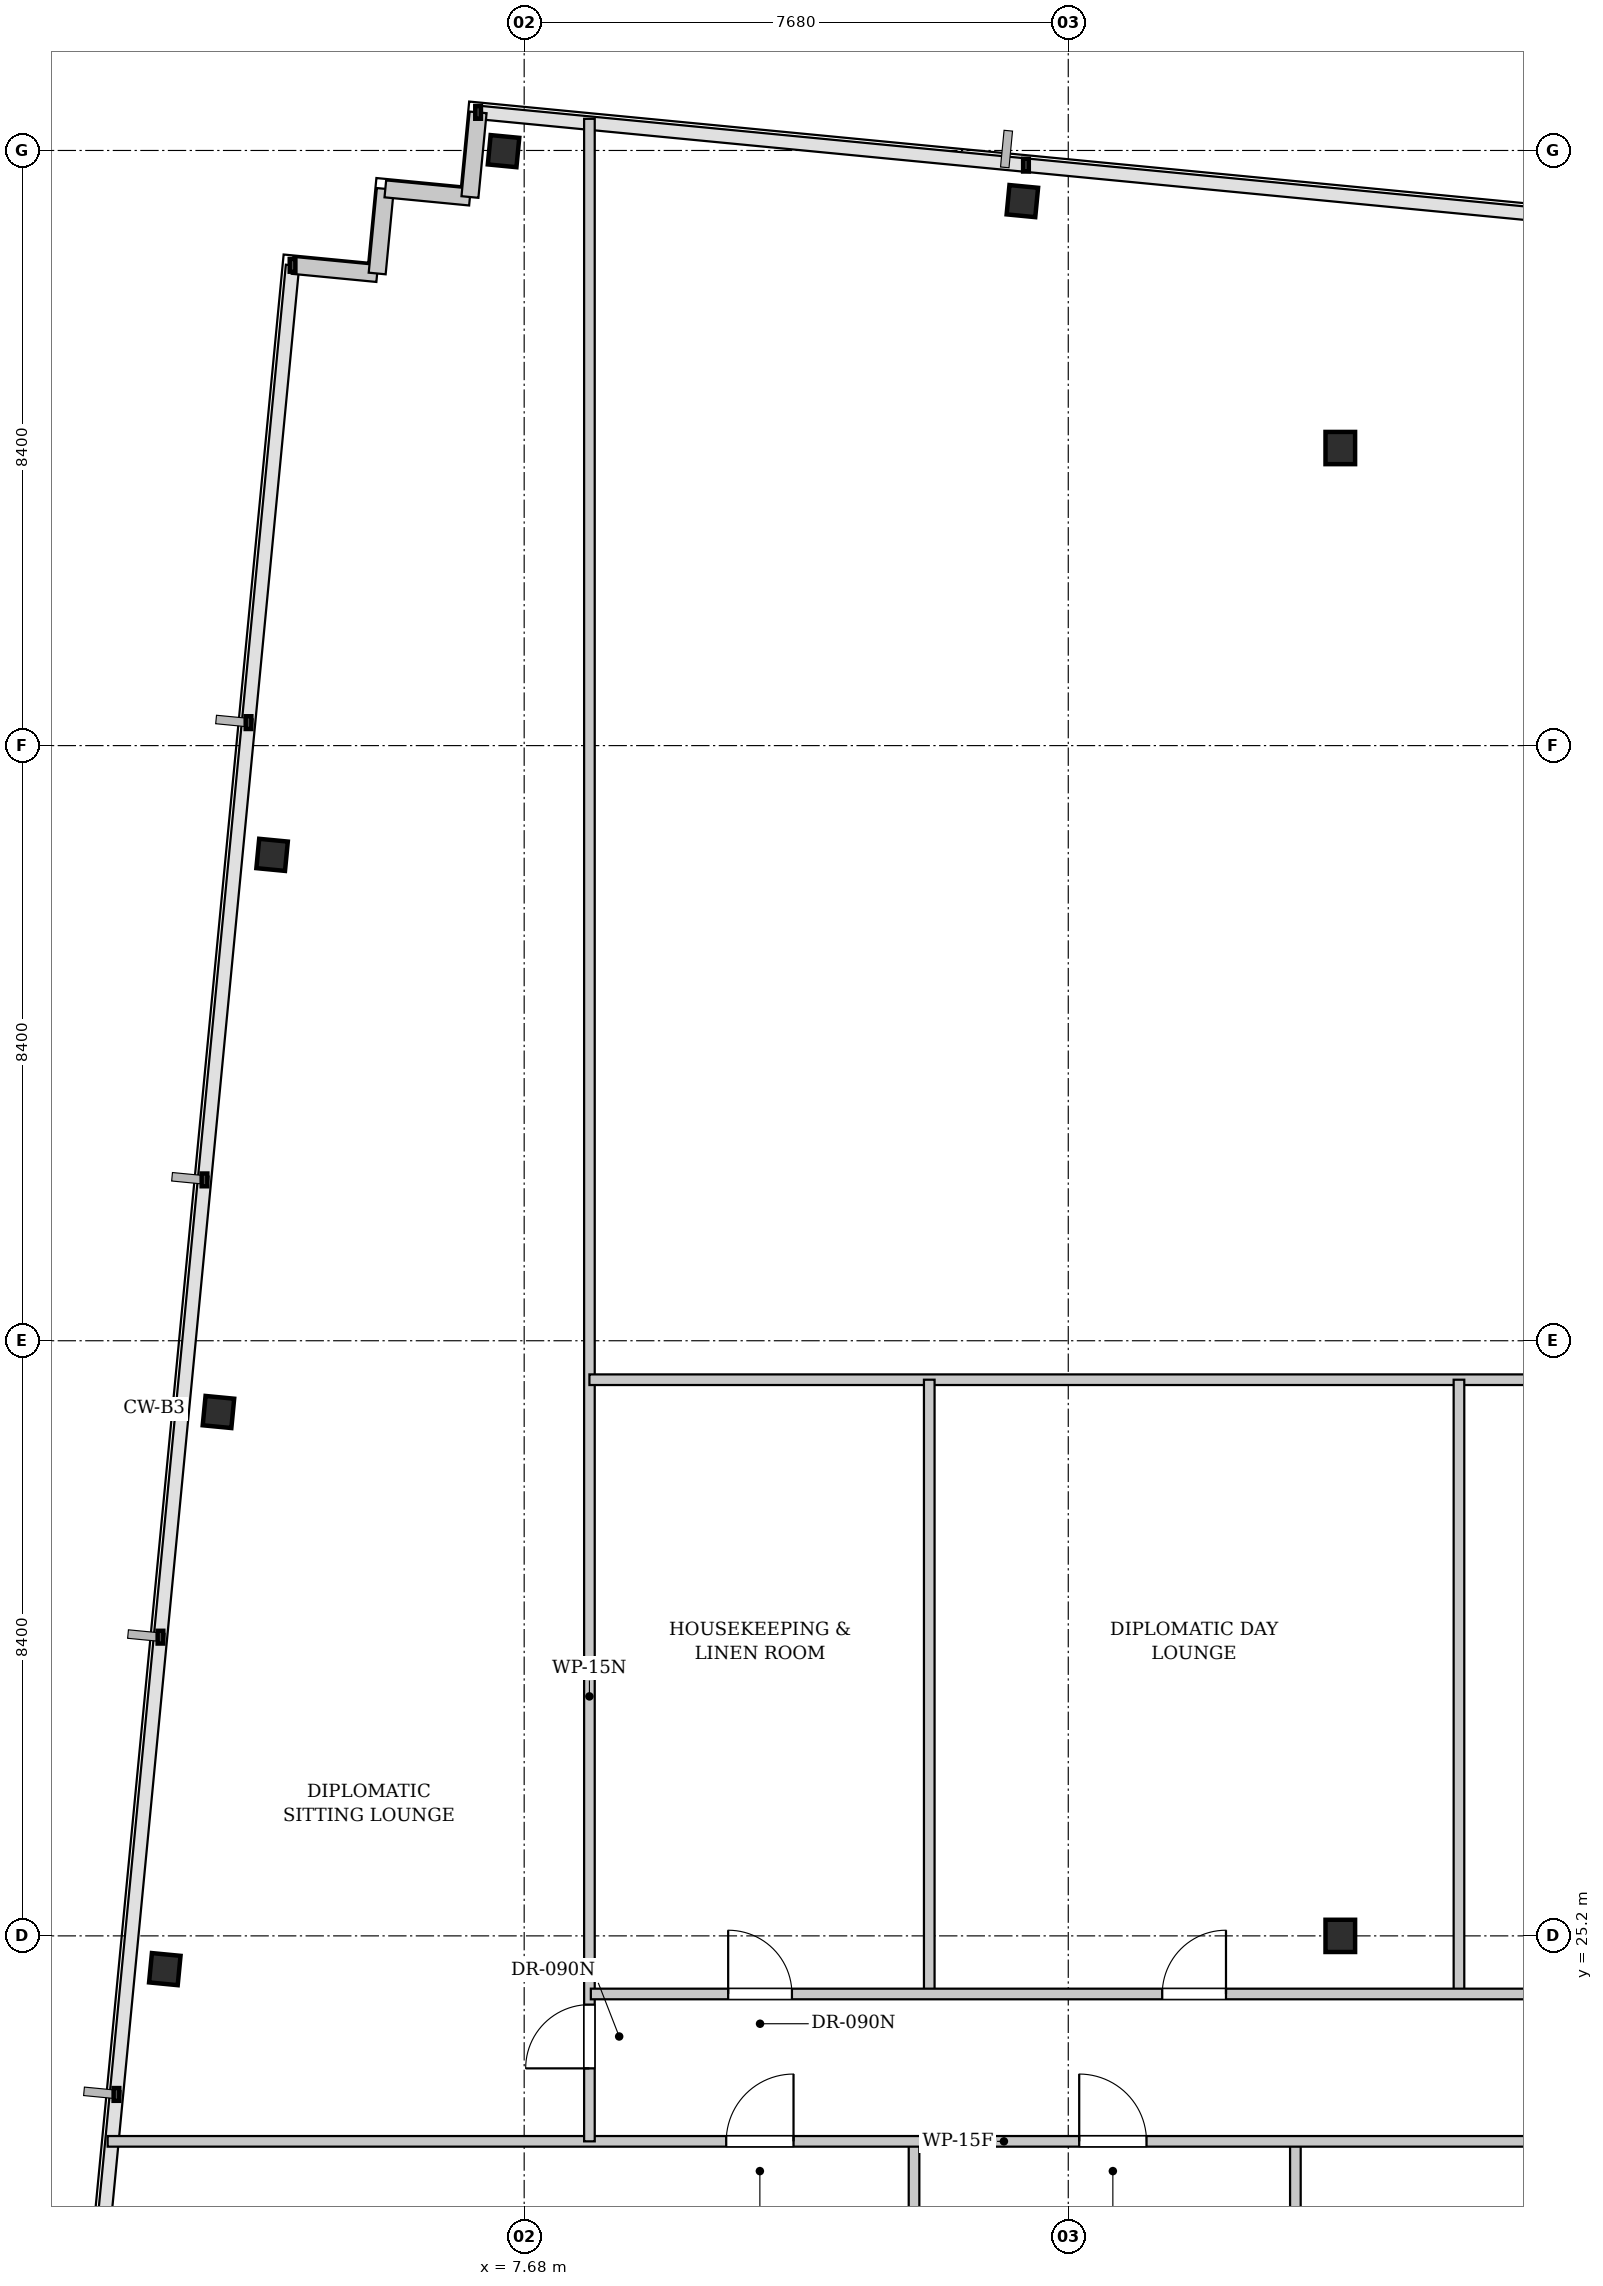
"""IFC4 building model, lengths in metres.
Left out: names, types, materials, properties, quantities, classifications, styles, units other than length and angle.
Written with IfcOpenShell. Run it as: python <this file> out.ifc"""

import sys

from ifc_helpers import new_model, si_unit, direction, frame, frame_2d, origin, origin_2d, place, context, subcontext, project, spatial, rectangle, i_section, extrude, element, fill, save


model = new_model("IFC4")
c1 = context("Model", 3, precision=1e-05, world=origin(), true_north=direction((0.0, 1.0)))
c2 = subcontext(c1, "Body", "Model", "MODEL_VIEW")
j1 = project(units=[si_unit("LENGTHUNIT", "METRE"), si_unit("PLANEANGLEUNIT", "RADIAN")], contexts=[c1])
p1 = place(None, origin())
s1 = spatial("IfcSite", under=j1, at=p1, CompositionType="ELEMENT")
p2 = place(p1, origin())
s2 = spatial("IfcBuilding", under=s1, at=p2, CompositionType="ELEMENT")
p3 = place(p2, frame((0.0, 0.0, 165.5)))
s3 = spatial("IfcBuildingStorey", under=s2, at=p3, CompositionType="ELEMENT", Elevation=165.5)
for number, where, z_axis, x_axis in (
    (1, (19.2, 25.2, 0.0), (0.0, 0.0, 1.0), (1.0, 0.0, 0.0)),
    (2, (19.2, 46.2, 0.0), (0.0, 0.0, 1.0), (1.0, 0.0, 0.0)),
):
    element("IfcColumn", number, at=place(p3, frame(where, z_axis=z_axis, x_axis=x_axis)), inside=s3, PredefinedType="COLUMN", context=c2, shape_type="SweptSolid", body=[
        extrude(i_section(OverallWidth=0.418, OverallDepth=0.455, WebThickness=0.042, FlangeThickness=0.068, FilletRadius=0.015, at=origin_2d()), origin(), (0.0, 0.0, 1.0), 3.3),
    ])
for number, where, z_axis, x_axis in (
    (3, (7.389, 50.391, 0.0), (0.0, 0.0, 1.0), (0.995, -0.096, 0.0)),
    (4, (14.712, 49.686, 0.0), (0.0, 0.0, 1.0), (0.995, -0.096, 0.0)),
    (5, (2.607, 24.731, 0.0), (0.0, 0.0, 1.0), (0.995, -0.096, 0.0)),
    (6, (3.365, 32.594, 0.0), (0.0, 0.0, 1.0), (0.995, -0.096, 0.0)),
    (7, (4.122, 40.458, 0.0), (0.0, 0.0, 1.0), (0.995, -0.096, 0.0)),
):
    element("IfcColumn", number, at=place(p3, frame(where, z_axis=z_axis, x_axis=x_axis)), inside=s3, PredefinedType="COLUMN", context=c2, shape_type="SweptSolid", body=[
        extrude(i_section(OverallWidth=0.406, OverallDepth=0.416, WebThickness=0.03, FlangeThickness=0.048, FilletRadius=0.015, at=origin_2d()), origin(), (0.0, 0.0, 1.0), 3.3),
    ])
p4 = place(p3, frame((4.411, 48.779, 0.0), z_axis=(0.0, 0.0, 1.0), x_axis=(0.995397091755, -0.095836473879, 0.0)))
e8 = element("IfcWall", 8, at=p4, inside=s3, PredefinedType="SOLIDWALL", context=c2, shape_type="SweptSolid", body=[
    extrude(rectangle(XDim=1.2, YDim=0.24, at=frame_2d((0.6, 0.0))), origin(), (0.0, 0.0, 1.0), 3.08),
])
p5 = place(p3, frame((5.605, 48.664, 0.0), z_axis=(0.0, 0.0, 1.0), x_axis=(0.096018626938, 0.995379537303, 0.0)))
e9 = element("IfcWall", 9, at=p5, inside=s3, PredefinedType="SOLIDWALL", context=c2, shape_type="SweptSolid", body=[
    extrude(rectangle(XDim=1.2, YDim=0.24, at=frame_2d((0.6, 0.0))), origin(), (0.0, 0.0, 1.0), 3.08),
])
for number, where, z_axis, x_axis in (
    (10, (5.72, 49.858, 0.0), (0.0, 0.0, 1.0), (0.995, -0.096, 0.0)),
    (11, (6.915, 49.743, 0.0), (0.0, 0.0, 1.0), (0.096, 0.995, 0.0)),
):
    element("IfcWall", number, at=place(p3, frame(where, z_axis=z_axis, x_axis=x_axis)), inside=s3, PredefinedType="SOLIDWALL", context=c2, shape_type="SweptSolid", body=[
        extrude(rectangle(XDim=1.2, YDim=0.24, at=frame_2d((0.6, 0.0))), origin(), (0.0, 0.0, 1.0), 3.08),
    ])
p6 = place(p3, frame((13.183, 12.893, 0.0), z_axis=(0.0, 0.0, 1.0), x_axis=(0.0, 1.0, 0.0)))
e12 = element("IfcWall", 12, at=p6, inside=s3, PredefinedType="PARTITIONING", context=c2, shape_type="SweptSolid", body=[
    extrude(rectangle(XDim=9.427, YDim=0.15, at=frame_2d((4.714, 0.0))), origin(), (0.0, 0.0, 1.0), 3.08),
])
p7 = place(p3, frame((18.566, 12.374, 0.0), z_axis=(0.0, 0.0, 1.0), x_axis=(0.0, 1.0, 0.0)))
e13 = element("IfcWall", 13, at=p7, inside=s3, PredefinedType="PARTITIONING", context=c2, shape_type="SweptSolid", body=[
    extrude(rectangle(XDim=9.946, YDim=0.15, at=frame_2d((4.973, 0.0))), origin(), (0.0, 0.0, 1.0), 2.475),
])
p8 = place(p3, frame((1.801, 22.3, 0.0), z_axis=(0.0, 0.0, 1.0), x_axis=(1.0, 0.0, 0.0)))
e14 = element("IfcWall", 14, at=p8, inside=s3, PredefinedType="PARTITIONING", context=c2, shape_type="SweptSolid", body=[
    extrude(rectangle(XDim=57.505, YDim=0.15, at=frame_2d((28.752, 0.0))), origin(), (0.0, 0.0, 1.0), 3.08),
])
p9 = place(p8, frame((8.731, 0.0, 0.0)))
e15 = element("IfcOpeningElement", 15, at=p9, cuts=e14, PredefinedType="OPENING", context=c2, shape_type="SweptSolid", body=[
    extrude(rectangle(XDim=0.95, YDim=2.15, at=frame_2d((0.475, 1.075))), frame((0.0, 0.085, 0.0), z_axis=(0.0, -1.0, 0.0), x_axis=(1.0, 0.0, 0.0)), (0.0, 0.0, 1.0), 0.17),
])
p10 = place(p8, frame((13.714, 0.0, 0.0)))
e16 = element("IfcOpeningElement", 16, at=p10, cuts=e14, PredefinedType="OPENING", context=c2, shape_type="SweptSolid", body=[
    extrude(rectangle(XDim=0.95, YDim=2.15, at=frame_2d((0.475, 1.075))), frame((0.0, 0.085, 0.0), z_axis=(0.0, -1.0, 0.0), x_axis=(1.0, 0.0, 0.0)), (0.0, 0.0, 1.0), 0.17),
])
p11 = place(p8, frame((20.506, 0.0, 0.0)))
e17 = element("IfcOpeningElement", 17, at=p11, cuts=e14, PredefinedType="OPENING", context=c2, shape_type="SweptSolid", body=[
    extrude(rectangle(XDim=0.95, YDim=2.15, at=frame_2d((0.475, 1.075))), frame((0.0, 0.085, 0.0), z_axis=(0.0, -1.0, 0.0), x_axis=(1.0, 0.0, 0.0)), (0.0, 0.0, 1.0), 0.17),
])
p12 = place(p8, frame((28.808, 0.0, 0.0)))
e18 = element("IfcOpeningElement", 18, at=p12, cuts=e14, PredefinedType="OPENING", context=c2, shape_type="SweptSolid", body=[
    extrude(rectangle(XDim=0.95, YDim=2.15, at=frame_2d((0.475, 1.075))), frame((0.0, 0.085, 0.0), z_axis=(0.0, -1.0, 0.0), x_axis=(1.0, 0.0, 0.0)), (0.0, 0.0, 1.0), 0.17),
])
p13 = place(p8, frame((37.209, 0.0, 0.0)))
e19 = element("IfcOpeningElement", 19, at=p13, cuts=e14, PredefinedType="OPENING", context=c2, shape_type="SweptSolid", body=[
    extrude(rectangle(XDim=0.95, YDim=2.15, at=frame_2d((0.475, 1.075))), frame((0.0, 0.085, 0.0), z_axis=(0.0, -1.0, 0.0), x_axis=(1.0, 0.0, 0.0)), (0.0, 0.0, 1.0), 0.17),
])
p14 = place(p8, frame((44.343, 0.0, 0.0)))
e20 = element("IfcOpeningElement", 20, at=p14, cuts=e14, PredefinedType="OPENING", context=c2, shape_type="SweptSolid", body=[
    extrude(rectangle(XDim=0.95, YDim=2.15, at=frame_2d((0.475, 1.075))), frame((0.0, 0.085, 0.0), z_axis=(0.0, -1.0, 0.0), x_axis=(1.0, 0.0, 0.0)), (0.0, 0.0, 1.0), 0.17),
])
p15 = place(p8, frame((49.811, 0.0, 0.0)))
e21 = element("IfcOpeningElement", 21, at=p15, cuts=e14, PredefinedType="OPENING", context=c2, shape_type="SweptSolid", body=[
    extrude(rectangle(XDim=0.95, YDim=2.15, at=frame_2d((0.475, 1.075))), frame((0.0, 0.085, 0.0), z_axis=(0.0, -1.0, 0.0), x_axis=(1.0, 0.0, 0.0)), (0.0, 0.0, 1.0), 0.17),
])
p16 = place(p3, frame((8.601, 22.3, 0.0), z_axis=(0.0, 0.0, 1.0), x_axis=(0.0, 1.0, 0.0)))
e22 = element("IfcWall", 22, at=p16, inside=s3, PredefinedType="PARTITIONING", context=c2, shape_type="SweptSolid", body=[
    extrude(rectangle(XDim=28.547, YDim=0.15, at=frame_2d((14.273, 0.0))), origin(), (0.0, 0.0, 1.0), 3.08),
])
p17 = place(p16, frame((1.03, 0.0, 0.0)))
e23 = element("IfcOpeningElement", 23, at=p17, cuts=e22, PredefinedType="OPENING", context=c2, shape_type="SweptSolid", body=[
    extrude(rectangle(XDim=0.9, YDim=2.15, at=frame_2d((0.45, 1.075))), frame((0.0, 0.085, 0.0), z_axis=(0.0, -1.0, 0.0), x_axis=(1.0, 0.0, 0.0)), (0.0, 0.0, 1.0), 0.17),
])
p18 = place(p3, frame((8.601, 33.05, 0.0), z_axis=(0.0, 0.0, 1.0), x_axis=(1.0, 0.0, 0.0)))
e24 = element("IfcWall", 24, at=p18, inside=s3, PredefinedType="PARTITIONING", context=c2, shape_type="SweptSolid", body=[
    extrude(rectangle(XDim=20.799, YDim=0.15, at=frame_2d((10.399, 0.0))), origin(), (0.0, 0.0, 1.0), 2.475),
])
for number, where, z_axis, x_axis in (
    (25, (13.398, 24.38, 0.0), (0.0, 0.0, 1.0), (0.0, 1.0, 0.0)),
    (26, (20.875, 24.38, 0.0), (0.0, 0.0, 1.0), (0.0, 1.0, 0.0)),
):
    element("IfcWall", number, at=place(p3, frame(where, z_axis=z_axis, x_axis=x_axis)), inside=s3, PredefinedType="PARTITIONING", context=c2, shape_type="SweptSolid", body=[
        extrude(rectangle(XDim=8.67, YDim=0.15, at=frame_2d((4.335, 0.0))), origin(), (0.0, 0.0, 1.0), 3.08),
    ])
p19 = place(p3, frame((8.621, 24.38, 0.0), z_axis=(0.0, 0.0, 1.0), x_axis=(1.0, 0.0, 0.0)))
e27 = element("IfcWall", 27, at=p19, inside=s3, PredefinedType="PARTITIONING", context=c2, shape_type="SweptSolid", body=[
    extrude(rectangle(XDim=20.769, YDim=0.15, at=frame_2d((10.384, 0.0))), origin(), (0.0, 0.0, 1.0), 3.08),
])
p20 = place(p19, frame((1.938, 0.0, 0.0)))
e28 = element("IfcOpeningElement", 28, at=p20, cuts=e27, PredefinedType="OPENING", context=c2, shape_type="SweptSolid", body=[
    extrude(rectangle(XDim=0.9, YDim=2.15, at=frame_2d((0.45, 1.075))), frame((0.0, 0.085, 0.0), z_axis=(0.0, -1.0, 0.0), x_axis=(1.0, 0.0, 0.0)), (0.0, 0.0, 1.0), 0.17),
])
p21 = place(p19, frame((8.065, 0.0, 0.0)))
e29 = element("IfcOpeningElement", 29, at=p21, cuts=e27, PredefinedType="OPENING", context=c2, shape_type="SweptSolid", body=[
    extrude(rectangle(XDim=0.9, YDim=2.15, at=frame_2d((0.45, 1.075))), frame((0.0, 0.085, 0.0), z_axis=(0.0, -1.0, 0.0), x_axis=(1.0, 0.0, 0.0)), (0.0, 0.0, 1.0), 0.17),
])
p22 = place(p19, frame((16.062, 0.0, 0.0)))
e30 = element("IfcOpeningElement", 30, at=p22, cuts=e27, PredefinedType="OPENING", context=c2, shape_type="SweptSolid", body=[
    extrude(rectangle(XDim=0.9, YDim=2.15, at=frame_2d((0.45, 1.075))), frame((0.0, 0.085, 0.0), z_axis=(0.0, -1.0, 0.0), x_axis=(1.0, 0.0, 0.0)), (0.0, 0.0, 1.0), 0.17),
])
p23 = place(p9, origin())
e31 = element("IfcDoor", 31, at=p23, inside=s3, OperationType="SINGLE_SWING_RIGHT", PredefinedType="DOOR", context=c2, shape_type="SweptSolid", body=[
    extrude(rectangle(XDim=0.95, YDim=2.15, at=frame_2d((0.475, 1.075))), frame((0.0, 0.025, 0.0), z_axis=(0.0, -1.0, 0.0), x_axis=(1.0, 0.0, 0.0)), (0.0, 0.0, 1.0), 0.05),
])
fill(e15, e31)
p24 = place(p10, origin())
e32 = element("IfcDoor", 32, at=p24, inside=s3, OperationType="SINGLE_SWING_LEFT", PredefinedType="DOOR", context=c2, shape_type="SweptSolid", body=[
    extrude(rectangle(XDim=0.95, YDim=2.15, at=frame_2d((0.475, 1.075))), frame((0.0, 0.025, 0.0), z_axis=(0.0, -1.0, 0.0), x_axis=(1.0, 0.0, 0.0)), (0.0, 0.0, 1.0), 0.05),
])
fill(e16, e32)
p25 = place(p17, origin())
e33 = element("IfcDoor", 33, at=p25, inside=s3, OperationType="SINGLE_SWING_LEFT", PredefinedType="DOOR", context=c2, shape_type="SweptSolid", body=[
    extrude(rectangle(XDim=0.9, YDim=2.15, at=frame_2d((0.45, 1.075))), frame((0.0, 0.025, 0.0), z_axis=(0.0, -1.0, 0.0), x_axis=(1.0, 0.0, 0.0)), (0.0, 0.0, 1.0), 0.05),
])
fill(e23, e33)
p26 = place(p20, origin())
e34 = element("IfcDoor", 34, at=p26, inside=s3, OperationType="SINGLE_SWING_LEFT", PredefinedType="DOOR", context=c2, shape_type="SweptSolid", body=[
    extrude(rectangle(XDim=0.9, YDim=2.15, at=frame_2d((0.45, 1.075))), frame((0.0, 0.025, 0.0), z_axis=(0.0, -1.0, 0.0), x_axis=(1.0, 0.0, 0.0)), (0.0, 0.0, 1.0), 0.05),
])
fill(e28, e34)
p27 = place(p21, origin())
e35 = element("IfcDoor", 35, at=p27, inside=s3, OperationType="SINGLE_SWING_RIGHT", PredefinedType="DOOR", context=c2, shape_type="SweptSolid", body=[
    extrude(rectangle(XDim=0.9, YDim=2.15, at=frame_2d((0.45, 1.075))), frame((0.0, 0.025, 0.0), z_axis=(0.0, -1.0, 0.0), x_axis=(1.0, 0.0, 0.0)), (0.0, 0.0, 1.0), 0.05),
])
fill(e29, e35)
save(model, sys.argv[1])
